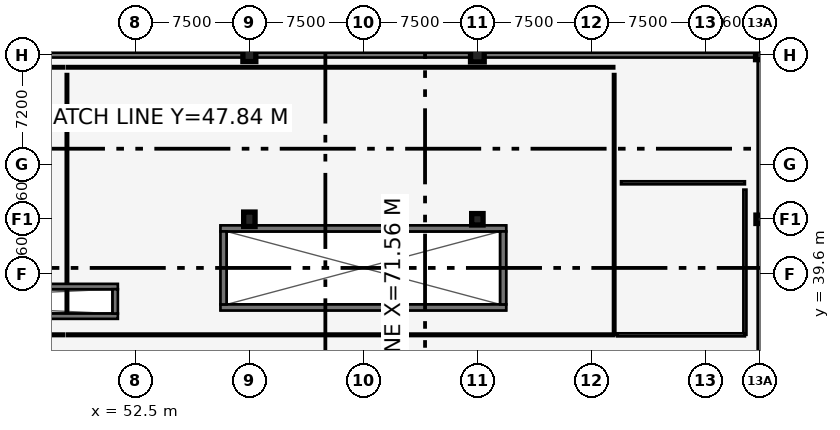
"""IFC4 building model, lengths in metres.
Left out: names, types, materials, properties, quantities, classifications, styles, units other than length and angle.
Written with IfcOpenShell. Run it as: python <this file> out.ifc"""

import sys

from ifc_helpers import new_model, si_unit, direction, frame, frame_2d, origin, origin_2d, place, context, subcontext, project, spatial, rectangle, circle, extrude, element, fill, save


model = new_model("IFC4")
c1 = context("Model", 3, precision=1e-05, world=origin(), true_north=direction((0.0, 1.0)))
c2 = subcontext(c1, "Body", "Model", "MODEL_VIEW")
j1 = project(units=[si_unit("LENGTHUNIT", "METRE"), si_unit("PLANEANGLEUNIT", "RADIAN")], contexts=[c1])
p1 = place(None, origin())
s1 = spatial("IfcSite", under=j1, at=p1, CompositionType="ELEMENT")
p2 = place(p1, origin())
s2 = spatial("IfcBuilding", under=s1, at=p2, CompositionType="ELEMENT")
p3 = place(p2, origin())
s3 = spatial("IfcBuildingStorey", under=s2, at=p3, CompositionType="ELEMENT", Elevation=0.0)
for number, where, z_axis, x_axis in (
    (1, (16.15, 36.825, -1.65), (0.0, 0.0, 1.0), (1.0, 0.0, 0.0)),
    (2, (16.15, 38.775, -1.65), (0.0, 0.0, 1.0), (1.0, 0.0, 0.0)),
):
    element("IfcWall", number, at=place(p3, frame(where, z_axis=z_axis, x_axis=x_axis)), inside=s3, PredefinedType="USERDEFINED", context=c2, shape_type="SweptSolid", body=[
        extrude(rectangle(XDim=35.2, YDim=0.35, at=frame_2d((17.6, 0.0))), origin(), (0.0, 0.0, 1.0), 1.225),
    ])
p4 = place(p3, frame((51.175, 37.0, -1.65), z_axis=(0.0, 0.0, 1.0), x_axis=(0.0, 1.0, 0.0)))
e3 = element("IfcWall", 3, at=p4, inside=s3, PredefinedType="USERDEFINED", context=c2, shape_type="SweptSolid", body=[
    extrude(rectangle(XDim=1.6, YDim=0.35, at=frame_2d((0.8, 0.0))), origin(), (0.0, 0.0, 1.0), 1.225),
])
for number, where, z_axis, x_axis in (
    (4, (58.1, 37.4, -2.3), (0.0, 0.0, 1.0), (1.0, 0.0, 0.0)),
    (5, (58.1, 42.6, -2.3), (0.0, 0.0, 1.0), (1.0, 0.0, 0.0)),
):
    element("IfcWall", number, at=place(p3, frame(where, z_axis=z_axis, x_axis=x_axis)), inside=s3, PredefinedType="USERDEFINED", context=c2, shape_type="SweptSolid", body=[
        extrude(rectangle(XDim=18.8, YDim=0.4, at=frame_2d((9.4, 0.0))), origin(), (0.0, 0.0, 1.0), 1.875),
    ])
for number, where, z_axis, x_axis in (
    (6, (58.3, 37.6, -2.3), (0.0, 0.0, 1.0), (0.0, 1.0, 0.0)),
    (7, (76.7, 37.6, -2.3), (0.0, 0.0, 1.0), (0.0, 1.0, 0.0)),
):
    element("IfcWall", number, at=place(p3, frame(where, z_axis=z_axis, x_axis=x_axis)), inside=s3, PredefinedType="USERDEFINED", context=c2, shape_type="SweptSolid", body=[
        extrude(rectangle(XDim=4.8, YDim=0.4, at=frame_2d((2.4, 0.0))), origin(), (0.0, 0.0, 1.0), 1.875),
    ])
p5 = place(p3, frame((60.0, 43.2, 0.0), z_axis=(0.0, 0.0, 1.0), x_axis=(1.0, 0.0, 0.0)))
e8 = element("IfcColumn", 8, at=p5, inside=s3, PredefinedType="COLUMN", context=c2, shape_type="SweptSolid", body=[
    extrude(rectangle(XDim=0.75, YDim=0.95, at=origin_2d()), origin(), (0.0, 0.0, 1.0), 4.8),
])
p6 = place(p3, frame((60.0, 54.0, 0.0), z_axis=(0.0, 0.0, 1.0), x_axis=(1.0, 0.0, 0.0)))
e9 = element("IfcColumn", 9, at=p6, inside=s3, PredefinedType="COLUMN", context=c2, shape_type="SweptSolid", body=[
    extrude(rectangle(XDim=0.85, YDim=0.85, at=origin_2d()), origin(), (0.0, 0.0, 1.0), 4.8),
])
p7 = place(p3, frame((75.0, 43.2, 0.0), z_axis=(0.0, 0.0, 1.0), x_axis=(1.0, 0.0, 0.0)))
e10 = element("IfcColumn", 10, at=p7, inside=s3, PredefinedType="COLUMN", context=c2, shape_type="SweptSolid", body=[
    extrude(circle(Radius=0.375, at=origin_2d()), origin(), (0.0, 0.0, 1.0), 4.8),
])
p8 = place(p3, frame((75.0, 54.0, 0.0), z_axis=(0.0, 0.0, 1.0), x_axis=(1.0, 0.0, 0.0)))
e11 = element("IfcColumn", 11, at=p8, inside=s3, PredefinedType="COLUMN", context=c2, shape_type="SweptSolid", body=[
    extrude(circle(Radius=0.45, at=origin_2d()), origin(), (0.0, 0.0, 1.0), 4.8),
])
p9 = place(p3, frame((93.6, 43.2, 0.0), z_axis=(0.0, 0.0, 1.0), x_axis=(1.0, 0.0, 0.0)))
e12 = element("IfcColumn", 12, at=p9, inside=s3, PredefinedType="COLUMN", context=c2, shape_type="SweptSolid", body=[
    extrude(rectangle(XDim=0.55, YDim=0.55, at=origin_2d()), origin(), (0.0, 0.0, 1.0), 4.8),
])
p10 = place(p3, frame((93.6, 54.0, 0.0), z_axis=(0.0, 0.0, 1.0), x_axis=(1.0, 0.0, 0.0)))
e13 = element("IfcColumn", 13, at=p10, inside=s3, PredefinedType="COLUMN", context=c2, shape_type="SweptSolid", body=[
    extrude(rectangle(XDim=0.6, YDim=0.6, at=origin_2d()), origin(), (0.0, 0.0, 1.0), 4.8),
])
p11 = place(p3, frame((93.6, 54.0, 0.0), z_axis=(0.0, 0.0, 1.0), x_axis=(-1.0, 0.0, 0.0)))
e14 = element("IfcWall", 14, at=p11, inside=s3, PredefinedType="SOLIDWALL", context=c2, shape_type="SweptSolid", body=[
    extrude(rectangle(XDim=93.6, YDim=0.32, at=frame_2d((46.8, 0.0))), origin(), (0.0, 0.0, 1.0), 3.92),
])
p12 = place(p11, frame((2.2, 0.0, 2.35)))
e15 = element("IfcOpeningElement", 15, at=p12, cuts=e14, PredefinedType="OPENING", context=c2, shape_type="SweptSolid", body=[
    extrude(rectangle(XDim=3.0, YDim=1.25, at=frame_2d((1.5, 0.625))), frame((0.0, 0.17, 0.0), z_axis=(0.0, -1.0, 0.0), x_axis=(1.0, 0.0, 0.0)), (0.0, 0.0, 1.0), 0.34),
])
p13 = place(p11, frame((9.4, 0.0, 2.35)))
e16 = element("IfcOpeningElement", 16, at=p13, cuts=e14, PredefinedType="OPENING", context=c2, shape_type="SweptSolid", body=[
    extrude(rectangle(XDim=2.4, YDim=1.2, at=frame_2d((1.2, 0.6))), frame((0.0, 0.17, 0.0), z_axis=(0.0, -1.0, 0.0), x_axis=(1.0, 0.0, 0.0)), (0.0, 0.0, 1.0), 0.34),
])
p14 = place(p11, frame((23.8, 0.0, 2.35)))
e17 = element("IfcOpeningElement", 17, at=p14, cuts=e14, PredefinedType="OPENING", context=c2, shape_type="SweptSolid", body=[
    extrude(rectangle(XDim=3.0, YDim=1.25, at=frame_2d((1.5, 0.625))), frame((0.0, 0.17, 0.0), z_axis=(0.0, -1.0, 0.0), x_axis=(1.0, 0.0, 0.0)), (0.0, 0.0, 1.0), 0.34),
])
p15 = place(p11, frame((38.2, 0.0, 2.35)))
e18 = element("IfcOpeningElement", 18, at=p15, cuts=e14, PredefinedType="OPENING", context=c2, shape_type="SweptSolid", body=[
    extrude(rectangle(XDim=2.7, YDim=1.2, at=frame_2d((1.35, 0.6))), frame((0.0, 0.17, 0.0), z_axis=(0.0, -1.0, 0.0), x_axis=(1.0, 0.0, 0.0)), (0.0, 0.0, 1.0), 0.34),
])
p16 = place(p11, frame((52.6, 0.0, 2.35)))
e19 = element("IfcOpeningElement", 19, at=p16, cuts=e14, PredefinedType="OPENING", context=c2, shape_type="SweptSolid", body=[
    extrude(rectangle(XDim=2.4, YDim=1.2, at=frame_2d((1.2, 0.6))), frame((0.0, 0.17, 0.0), z_axis=(0.0, -1.0, 0.0), x_axis=(1.0, 0.0, 0.0)), (0.0, 0.0, 1.0), 0.34),
])
p17 = place(p11, frame((59.8, 0.0, 2.35)))
e20 = element("IfcOpeningElement", 20, at=p17, cuts=e14, PredefinedType="OPENING", context=c2, shape_type="SweptSolid", body=[
    extrude(rectangle(XDim=2.7, YDim=1.2, at=frame_2d((1.35, 0.6))), frame((0.0, 0.17, 0.0), z_axis=(0.0, -1.0, 0.0), x_axis=(1.0, 0.0, 0.0)), (0.0, 0.0, 1.0), 0.34),
])
p18 = place(p11, frame((67.0, 0.0, 2.35)))
e21 = element("IfcOpeningElement", 21, at=p18, cuts=e14, PredefinedType="OPENING", context=c2, shape_type="SweptSolid", body=[
    extrude(rectangle(XDim=3.0, YDim=1.25, at=frame_2d((1.5, 0.625))), frame((0.0, 0.17, 0.0), z_axis=(0.0, -1.0, 0.0), x_axis=(1.0, 0.0, 0.0)), (0.0, 0.0, 1.0), 0.34),
])
p19 = place(p11, frame((74.2, 0.0, 2.35)))
e22 = element("IfcOpeningElement", 22, at=p19, cuts=e14, PredefinedType="OPENING", context=c2, shape_type="SweptSolid", body=[
    extrude(rectangle(XDim=2.4, YDim=1.2, at=frame_2d((1.2, 0.6))), frame((0.0, 0.17, 0.0), z_axis=(0.0, -1.0, 0.0), x_axis=(1.0, 0.0, 0.0)), (0.0, 0.0, 1.0), 0.34),
])
p20 = place(p11, frame((81.4, 0.0, 2.35)))
e23 = element("IfcOpeningElement", 23, at=p20, cuts=e14, PredefinedType="OPENING", context=c2, shape_type="SweptSolid", body=[
    extrude(rectangle(XDim=2.7, YDim=1.2, at=frame_2d((1.35, 0.6))), frame((0.0, 0.17, 0.0), z_axis=(0.0, -1.0, 0.0), x_axis=(1.0, 0.0, 0.0)), (0.0, 0.0, 1.0), 0.34),
])
p21 = place(p11, frame((6.2, 0.0, 0.0)))
e24 = element("IfcOpeningElement", 24, at=p21, cuts=e14, PredefinedType="OPENING", context=c2, shape_type="SweptSolid", body=[
    extrude(rectangle(XDim=2.0, YDim=2.35, at=frame_2d((1.0, 1.175))), frame((0.0, 0.17, 0.0), z_axis=(0.0, -1.0, 0.0), x_axis=(1.0, 0.0, 0.0)), (0.0, 0.0, 1.0), 0.34),
])
p22 = place(p11, frame((20.6, 0.0, 0.0)))
e25 = element("IfcOpeningElement", 25, at=p22, cuts=e14, PredefinedType="OPENING", context=c2, shape_type="SweptSolid", body=[
    extrude(rectangle(XDim=1.1, YDim=2.1, at=frame_2d((0.55, 1.05))), frame((0.0, 0.17, 0.0), z_axis=(0.0, -1.0, 0.0), x_axis=(1.0, 0.0, 0.0)), (0.0, 0.0, 1.0), 0.34),
])
p23 = place(p11, frame((35.0, 0.0, 0.0)))
e26 = element("IfcOpeningElement", 26, at=p23, cuts=e14, PredefinedType="OPENING", context=c2, shape_type="SweptSolid", body=[
    extrude(rectangle(XDim=2.0, YDim=2.35, at=frame_2d((1.0, 1.175))), frame((0.0, 0.17, 0.0), z_axis=(0.0, -1.0, 0.0), x_axis=(1.0, 0.0, 0.0)), (0.0, 0.0, 1.0), 0.34),
])
p24 = place(p11, frame((49.4, 0.0, 0.0)))
e27 = element("IfcOpeningElement", 27, at=p24, cuts=e14, PredefinedType="OPENING", context=c2, shape_type="SweptSolid", body=[
    extrude(rectangle(XDim=2.0, YDim=2.35, at=frame_2d((1.0, 1.175))), frame((0.0, 0.17, 0.0), z_axis=(0.0, -1.0, 0.0), x_axis=(1.0, 0.0, 0.0)), (0.0, 0.0, 1.0), 0.34),
])
p25 = place(p3, frame((93.6, 10.8, 0.0), z_axis=(0.0, 0.0, 1.0), x_axis=(0.0, 1.0, 0.0)))
e28 = element("IfcWall", 28, at=p25, inside=s3, PredefinedType="SOLIDWALL", context=c2, shape_type="SweptSolid", body=[
    extrude(rectangle(XDim=43.2, YDim=0.32, at=frame_2d((21.6, 0.0))), origin(), (0.0, 0.0, 1.0), 4.25),
])
p26 = place(p25, frame((6.5, 0.0, 0.0)))
e29 = element("IfcOpeningElement", 29, at=p26, cuts=e28, PredefinedType="OPENING", context=c2, shape_type="SweptSolid", body=[
    extrude(rectangle(XDim=4.4, YDim=3.55, at=frame_2d((2.2, 1.775))), frame((0.0, 0.17, 0.0), z_axis=(0.0, -1.0, 0.0), x_axis=(1.0, 0.0, 0.0)), (0.0, 0.0, 1.0), 0.34),
])
p27 = place(p25, frame((25.5, 0.0, 0.0)))
e30 = element("IfcOpeningElement", 30, at=p27, cuts=e28, PredefinedType="OPENING", context=c2, shape_type="SweptSolid", body=[
    extrude(rectangle(XDim=4.4, YDim=3.55, at=frame_2d((2.2, 1.775))), frame((0.0, 0.17, 0.0), z_axis=(0.0, -1.0, 0.0), x_axis=(1.0, 0.0, 0.0)), (0.0, 0.0, 1.0), 0.34),
])
p28 = place(p3, frame((48.0, 53.2, 0.0), z_axis=(0.0, 0.0, 1.0), x_axis=(1.0, 0.0, 0.0)))
e31 = element("IfcWall", 31, at=p28, inside=s3, PredefinedType="PARTITIONING", context=c2, shape_type="SweptSolid", body=[
    extrude(rectangle(XDim=36.0, YDim=0.15, at=frame_2d((18.0, 0.0))), origin(), (0.0, 0.0, 1.0), 4.1),
])
p29 = place(p3, frame((84.0, 35.6, 0.0), z_axis=(0.0, 0.0, 1.0), x_axis=(0.0, 1.0, 0.0)))
e32 = element("IfcWall", 32, at=p29, inside=s3, PredefinedType="PARTITIONING", context=c2, shape_type="SweptSolid", body=[
    extrude(rectangle(XDim=17.15, YDim=0.15, at=frame_2d((8.575, 0.0))), origin(), (0.0, 0.0, 1.0), 4.1),
])
p30 = place(p3, frame((48.0, 52.75, 0.0), z_axis=(0.0, 0.0, 1.0), x_axis=(0.0, -1.0, 0.0)))
e33 = element("IfcWall", 33, at=p30, inside=s3, PredefinedType="PARTITIONING", context=c2, shape_type="SweptSolid", body=[
    extrude(rectangle(XDim=13.755, YDim=0.15, at=frame_2d((6.877, 0.0))), origin(), (0.0, 0.0, 1.0), 4.1),
])
p31 = place(p3, frame((48.0, 38.555, 0.0), z_axis=(0.0, 0.0, 1.0), x_axis=(0.0, -1.0, 0.0)))
e34 = element("IfcWall", 34, at=p31, inside=s3, PredefinedType="PARTITIONING", context=c2, shape_type="SweptSolid", body=[
    extrude(rectangle(XDim=1.51, YDim=0.15, at=frame_2d((0.755, 0.0))), origin(), (0.0, 0.0, 1.0), 4.1),
])
p32 = place(p3, frame((84.0, 35.6, 0.0), z_axis=(0.0, 0.0, 1.0), x_axis=(-1.0, 0.0, 0.0)))
e35 = element("IfcWall", 35, at=p32, inside=s3, PredefinedType="PARTITIONING", context=c2, shape_type="SweptSolid", body=[
    extrude(rectangle(XDim=36.0, YDim=0.16, at=frame_2d((18.0, 0.0))), origin(), (0.0, 0.0, 1.0), 4.025),
])
p33 = place(p32, frame((17.0, 0.0, 0.0)))
e36 = element("IfcOpeningElement", 36, at=p33, cuts=e35, PredefinedType="OPENING", context=c2, shape_type="SweptSolid", body=[
    extrude(rectangle(XDim=2.0, YDim=2.3, at=frame_2d((1.0, 1.15))), frame((0.0, 0.09, 0.0), z_axis=(0.0, -1.0, 0.0), x_axis=(1.0, 0.0, 0.0)), (0.0, 0.0, 1.0), 0.18),
])
p34 = place(p32, frame((30.8, 0.0, 0.0)))
e37 = element("IfcOpeningElement", 37, at=p34, cuts=e35, PredefinedType="OPENING", context=c2, shape_type="SweptSolid", body=[
    extrude(rectangle(XDim=2.0, YDim=2.3, at=frame_2d((1.0, 1.15))), frame((0.0, 0.09, 0.0), z_axis=(0.0, -1.0, 0.0), x_axis=(1.0, 0.0, 0.0)), (0.0, 0.0, 1.0), 0.18),
])
p35 = place(p3, frame((15.2, 53.2, 0.0), z_axis=(0.0, 0.0, 1.0), x_axis=(1.0, 0.0, 0.0)))
e38 = element("IfcWall", 38, at=p35, inside=s3, PredefinedType="PARTITIONING", context=c2, shape_type="SweptSolid", body=[
    extrude(rectangle(XDim=32.6, YDim=0.15, at=frame_2d((16.3, 0.0))), origin(), (0.0, 0.0, 1.0), 4.1),
])
p36 = place(p3, frame((47.8, 35.6, 0.0), z_axis=(0.0, 0.0, 1.0), x_axis=(-1.0, 0.0, 0.0)))
e39 = element("IfcWall", 39, at=p36, inside=s3, PredefinedType="PARTITIONING", context=c2, shape_type="SweptSolid", body=[
    extrude(rectangle(XDim=32.6, YDim=0.16, at=frame_2d((16.3, 0.0))), origin(), (0.0, 0.0, 1.0), 4.025),
])
p37 = place(p36, frame((15.3, 0.0, 0.0)))
e40 = element("IfcOpeningElement", 40, at=p37, cuts=e39, PredefinedType="OPENING", context=c2, shape_type="SweptSolid", body=[
    extrude(rectangle(XDim=2.0, YDim=2.3, at=frame_2d((1.0, 1.15))), frame((0.0, 0.09, 0.0), z_axis=(0.0, -1.0, 0.0), x_axis=(1.0, 0.0, 0.0)), (0.0, 0.0, 1.0), 0.18),
])
p38 = place(p36, frame((27.4, 0.0, 0.0)))
e41 = element("IfcOpeningElement", 41, at=p38, cuts=e39, PredefinedType="OPENING", context=c2, shape_type="SweptSolid", body=[
    extrude(rectangle(XDim=2.0, YDim=2.3, at=frame_2d((1.0, 1.15))), frame((0.0, 0.09, 0.0), z_axis=(0.0, -1.0, 0.0), x_axis=(1.0, 0.0, 0.0)), (0.0, 0.0, 1.0), 0.18),
])
p39 = place(p3, frame((84.45, 45.6, 0.0), z_axis=(0.0, 0.0, 1.0), x_axis=(1.0, 0.0, 0.0)))
e42 = element("IfcWall", 42, at=p39, inside=s3, PredefinedType="SOLIDWALL", context=c2, shape_type="SweptSolid", body=[
    extrude(rectangle(XDim=8.15, YDim=0.2, at=frame_2d((4.075, 0.0))), origin(), (0.0, 0.0, 1.0), 4.1),
])
p40 = place(p3, frame((92.6, 35.6, 0.0), z_axis=(0.0, 0.0, 1.0), x_axis=(0.0, 1.0, 0.0)))
e43 = element("IfcWall", 43, at=p40, inside=s3, PredefinedType="SOLIDWALL", context=c2, shape_type="SweptSolid", body=[
    extrude(rectangle(XDim=9.55, YDim=0.2, at=frame_2d((4.775, 0.0))), origin(), (0.0, 0.0, 1.0), 4.1),
])
p41 = place(p3, frame((92.6, 35.6, 0.0), z_axis=(0.0, 0.0, 1.0), x_axis=(-1.0, 0.0, 0.0)))
e44 = element("IfcWall", 44, at=p41, inside=s3, PredefinedType="SOLIDWALL", context=c2, shape_type="SweptSolid", body=[
    extrude(rectangle(XDim=8.4, YDim=0.2, at=frame_2d((4.2, 0.0))), origin(), (0.0, 0.0, 1.0), 4.1),
])
p42 = place(p41, frame((3.3, 0.0, 0.0)))
e45 = element("IfcOpeningElement", 45, at=p42, cuts=e44, PredefinedType="OPENING", context=c2, shape_type="SweptSolid", body=[
    extrude(rectangle(XDim=1.8, YDim=2.2, at=frame_2d((0.9, 1.1))), frame((0.0, 0.11, 0.0), z_axis=(0.0, -1.0, 0.0), x_axis=(1.0, 0.0, 0.0)), (0.0, 0.0, 1.0), 0.22),
])
p43 = place(p12, origin())
e46 = element("IfcWindow", 46, at=p43, inside=s3, PartitioningType="SINGLE_PANEL", PredefinedType="WINDOW", context=c2, shape_type="SweptSolid", body=[
    extrude(rectangle(XDim=3.0, YDim=1.25, at=frame_2d((1.5, 0.625))), frame((0.0, 0.03, 0.0), z_axis=(0.0, -1.0, 0.0), x_axis=(1.0, 0.0, 0.0)), (0.0, 0.0, 1.0), 0.06),
])
fill(e15, e46)
p44 = place(p13, origin())
e47 = element("IfcWindow", 47, at=p44, inside=s3, PartitioningType="SINGLE_PANEL", PredefinedType="WINDOW", context=c2, shape_type="SweptSolid", body=[
    extrude(rectangle(XDim=2.4, YDim=1.2, at=frame_2d((1.2, 0.6))), frame((0.0, 0.03, 0.0), z_axis=(0.0, -1.0, 0.0), x_axis=(1.0, 0.0, 0.0)), (0.0, 0.0, 1.0), 0.06),
])
fill(e16, e47)
p45 = place(p14, origin())
e48 = element("IfcWindow", 48, at=p45, inside=s3, PartitioningType="SINGLE_PANEL", PredefinedType="WINDOW", context=c2, shape_type="SweptSolid", body=[
    extrude(rectangle(XDim=3.0, YDim=1.25, at=frame_2d((1.5, 0.625))), frame((0.0, 0.03, 0.0), z_axis=(0.0, -1.0, 0.0), x_axis=(1.0, 0.0, 0.0)), (0.0, 0.0, 1.0), 0.06),
])
fill(e17, e48)
p46 = place(p15, origin())
e49 = element("IfcWindow", 49, at=p46, inside=s3, PartitioningType="SINGLE_PANEL", PredefinedType="WINDOW", context=c2, shape_type="SweptSolid", body=[
    extrude(rectangle(XDim=2.7, YDim=1.2, at=frame_2d((1.35, 0.6))), frame((0.0, 0.03, 0.0), z_axis=(0.0, -1.0, 0.0), x_axis=(1.0, 0.0, 0.0)), (0.0, 0.0, 1.0), 0.06),
])
fill(e18, e49)
p47 = place(p21, frame((2.0, 0.0, 0.0), z_axis=(0.0, 0.0, 1.0), x_axis=(-1.0, 0.0, 0.0)))
e50 = element("IfcDoor", 50, at=p47, inside=s3, OperationType="DOUBLE_SWING_LEFT", PredefinedType="DOOR", context=c2, shape_type="SweptSolid", body=[
    extrude(rectangle(XDim=2.0, YDim=2.35, at=frame_2d((1.0, 1.175))), frame((0.0, 0.025, 0.0), z_axis=(0.0, -1.0, 0.0), x_axis=(1.0, 0.0, 0.0)), (0.0, 0.0, 1.0), 0.05),
])
fill(e24, e50)
p48 = place(p22, frame((1.1, 0.0, 0.0), z_axis=(0.0, 0.0, 1.0), x_axis=(-1.0, 0.0, 0.0)))
e51 = element("IfcDoor", 51, at=p48, inside=s3, OperationType="SINGLE_SWING_LEFT", PredefinedType="DOOR", context=c2, shape_type="SweptSolid", body=[
    extrude(rectangle(XDim=1.1, YDim=2.1, at=frame_2d((0.55, 1.05))), frame((0.0, 0.025, 0.0), z_axis=(0.0, -1.0, 0.0), x_axis=(1.0, 0.0, 0.0)), (0.0, 0.0, 1.0), 0.05),
])
fill(e25, e51)
p49 = place(p23, frame((2.0, 0.0, 0.0), z_axis=(0.0, 0.0, 1.0), x_axis=(-1.0, 0.0, 0.0)))
e52 = element("IfcDoor", 52, at=p49, inside=s3, OperationType="DOUBLE_SWING_LEFT", PredefinedType="DOOR", context=c2, shape_type="SweptSolid", body=[
    extrude(rectangle(XDim=2.0, YDim=2.35, at=frame_2d((1.0, 1.175))), frame((0.0, 0.025, 0.0), z_axis=(0.0, -1.0, 0.0), x_axis=(1.0, 0.0, 0.0)), (0.0, 0.0, 1.0), 0.05),
])
fill(e26, e52)
p50 = place(p27, origin())
e53 = element("IfcDoor", 53, at=p50, inside=s3, OperationType="SLIDING_TO_LEFT", PredefinedType="GATE", context=c2, shape_type="SweptSolid", body=[
    extrude(rectangle(XDim=4.4, YDim=3.55, at=frame_2d((2.2, 1.775))), frame((0.0, 0.025, 0.0), z_axis=(0.0, -1.0, 0.0), x_axis=(1.0, 0.0, 0.0)), (0.0, 0.0, 1.0), 0.05),
])
fill(e30, e53)
p51 = place(p33, origin())
e54 = element("IfcDoor", 54, at=p51, inside=s3, OperationType="DOUBLE_SWING_LEFT", PredefinedType="DOOR", context=c2, shape_type="SweptSolid", body=[
    extrude(rectangle(XDim=2.0, YDim=2.3, at=frame_2d((1.0, 1.15))), frame((0.0, 0.025, 0.0), z_axis=(0.0, -1.0, 0.0), x_axis=(1.0, 0.0, 0.0)), (0.0, 0.0, 1.0), 0.05),
])
fill(e36, e54)
p52 = place(p34, origin())
e55 = element("IfcDoor", 55, at=p52, inside=s3, OperationType="DOUBLE_SWING_LEFT", PredefinedType="DOOR", context=c2, shape_type="SweptSolid", body=[
    extrude(rectangle(XDim=2.0, YDim=2.3, at=frame_2d((1.0, 1.15))), frame((0.0, 0.025, 0.0), z_axis=(0.0, -1.0, 0.0), x_axis=(1.0, 0.0, 0.0)), (0.0, 0.0, 1.0), 0.05),
])
fill(e37, e55)
p53 = place(p42, origin())
e56 = element("IfcDoor", 56, at=p53, inside=s3, OperationType="DOUBLE_SWING_LEFT", PredefinedType="DOOR", context=c2, shape_type="SweptSolid", body=[
    extrude(rectangle(XDim=1.8, YDim=2.2, at=frame_2d((0.9, 1.1))), frame((0.0, 0.025, 0.0), z_axis=(0.0, -1.0, 0.0), x_axis=(1.0, 0.0, 0.0)), (0.0, 0.0, 1.0), 0.05),
])
fill(e45, e56)
save(model, sys.argv[1])
